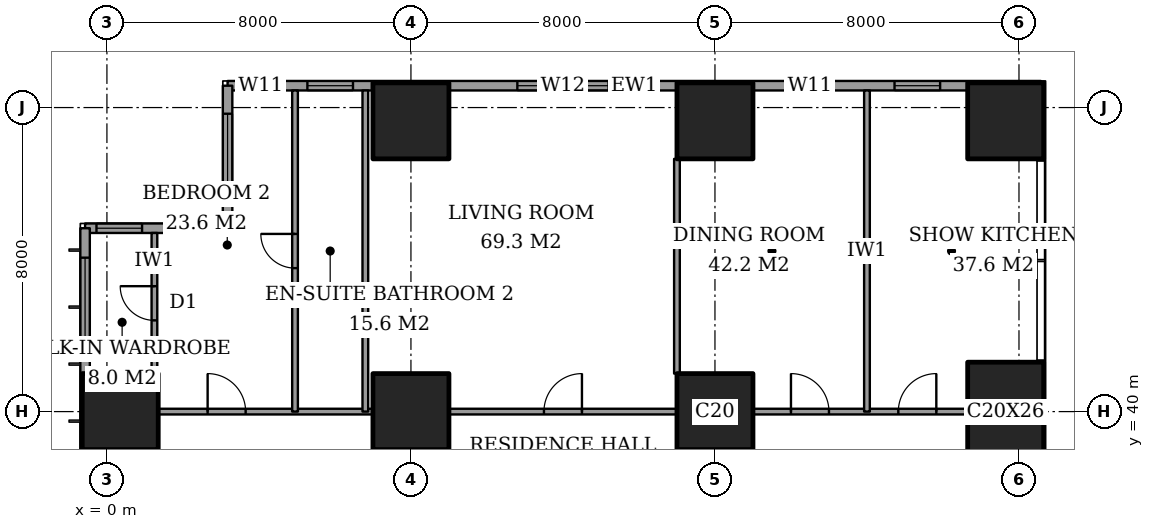
"""IFC4 building model, lengths in metres.
Left out: names, types, materials, properties, quantities, classifications, styles, units other than length and angle.
Written with IfcOpenShell. Run it as: python <this file> out.ifc"""

import sys

from ifc_helpers import new_model, si_unit, direction, frame, frame_2d, origin, origin_2d, place, context, subcontext, project, spatial, rectangle, extrude, element, fill, save


model = new_model("IFC4")
c1 = context("Model", 3, precision=1e-05, world=origin(), true_north=direction((0.0, 1.0)))
c2 = subcontext(c1, "Body", "Model", "MODEL_VIEW")
j1 = project(units=[si_unit("LENGTHUNIT", "METRE"), si_unit("PLANEANGLEUNIT", "RADIAN")], contexts=[c1])
p1 = place(None, origin())
s1 = spatial("IfcSite", under=j1, at=p1, CompositionType="ELEMENT")
p2 = place(p1, origin())
s2 = spatial("IfcBuilding", under=s1, at=p2, CompositionType="ELEMENT")
p3 = place(p2, frame((0.0, 0.0, 150.2)))
s3 = spatial("IfcBuildingStorey", under=s2, at=p3, CompositionType="ELEMENT", Elevation=150.2)
for number, where, z_axis, x_axis in (
    (1, (0.35, 40.0, 0.0), (0.0, 0.0, 1.0), (1.0, 0.0, 0.0)),
    (2, (8.0, 40.0, 0.0), (0.0, 0.0, 1.0), (1.0, 0.0, 0.0)),
    (3, (8.0, 47.65, 0.0), (0.0, 0.0, 1.0), (1.0, 0.0, 0.0)),
    (4, (16.0, 40.0, 0.0), (0.0, 0.0, 1.0), (1.0, 0.0, 0.0)),
    (5, (16.0, 47.65, 0.0), (0.0, 0.0, 1.0), (1.0, 0.0, 0.0)),
):
    element("IfcColumn", number, at=place(p3, frame(where, z_axis=z_axis, x_axis=x_axis)), inside=s3, PredefinedType="COLUMN", context=c2, shape_type="SweptSolid", body=[
        extrude(rectangle(XDim=2.0, YDim=2.0, at=origin_2d()), origin(), (0.0, 0.0, 1.0), 3.6),
    ])
p4 = place(p3, frame((23.65, 40.0, 0.0), z_axis=(0.0, 0.0, 1.0), x_axis=(1.0, 0.0, 0.0)))
e6 = element("IfcColumn", 6, at=p4, inside=s3, PredefinedType="COLUMN", context=c2, shape_type="SweptSolid", body=[
    extrude(rectangle(XDim=2.0, YDim=2.6, at=origin_2d()), origin(), (0.0, 0.0, 1.0), 3.6),
])
p5 = place(p3, frame((23.65, 47.65, 0.0), z_axis=(0.0, 0.0, 1.0), x_axis=(1.0, 0.0, 0.0)))
e7 = element("IfcColumn", 7, at=p5, inside=s3, PredefinedType="COLUMN", context=c2, shape_type="SweptSolid", body=[
    extrude(rectangle(XDim=2.0, YDim=2.0, at=origin_2d()), origin(), (0.0, 0.0, 1.0), 3.6),
])
p6 = place(p3, frame((24.575, 48.575, 0.0), z_axis=(0.0, 0.0, 1.0), x_axis=(-1.0, 0.0, 0.0)))
e8 = element("IfcWall", 8, at=p6, inside=s3, PredefinedType="SOLIDWALL", context=c2, shape_type="SweptSolid", body=[
    extrude(rectangle(XDim=21.4, YDim=0.25, at=frame_2d((10.7, 0.0))), origin(), (0.0, 0.0, 1.0), 3.6),
])
p7 = place(p6, frame((2.65, 0.0, 0.4)))
e9 = element("IfcOpeningElement", 9, at=p7, cuts=e8, PredefinedType="OPENING", context=c2, shape_type="SweptSolid", body=[
    extrude(rectangle(XDim=1.2, YDim=2.2, at=frame_2d((0.6, 1.1))), frame((0.0, 0.135, 0.0), z_axis=(0.0, -1.0, 0.0), x_axis=(1.0, 0.0, 0.0)), (0.0, 0.0, 1.0), 0.27),
])
p8 = place(p6, frame((5.475, 0.0, 0.4)))
e10 = element("IfcOpeningElement", 10, at=p8, cuts=e8, PredefinedType="OPENING", context=c2, shape_type="SweptSolid", body=[
    extrude(rectangle(XDim=1.2, YDim=2.2, at=frame_2d((0.6, 1.1))), frame((0.0, 0.135, 0.0), z_axis=(0.0, -1.0, 0.0), x_axis=(1.0, 0.0, 0.0)), (0.0, 0.0, 1.0), 0.27),
])
p9 = place(p6, frame((11.375, 0.0, 0.4)))
e11 = element("IfcOpeningElement", 11, at=p9, cuts=e8, PredefinedType="OPENING", context=c2, shape_type="SweptSolid", body=[
    extrude(rectangle(XDim=2.4, YDim=2.2, at=frame_2d((1.2, 1.1))), frame((0.0, 0.135, 0.0), z_axis=(0.0, -1.0, 0.0), x_axis=(1.0, 0.0, 0.0)), (0.0, 0.0, 1.0), 0.27),
])
p10 = place(p6, frame((18.1, 0.0, 0.4)))
e12 = element("IfcOpeningElement", 12, at=p10, cuts=e8, PredefinedType="OPENING", context=c2, shape_type="SweptSolid", body=[
    extrude(rectangle(XDim=1.2, YDim=2.2, at=frame_2d((0.6, 1.1))), frame((0.0, 0.135, 0.0), z_axis=(0.0, -1.0, 0.0), x_axis=(1.0, 0.0, 0.0)), (0.0, 0.0, 1.0), 0.27),
])
p11 = place(p6, frame((19.925, 0.0, 0.4)))
e13 = element("IfcOpeningElement", 13, at=p11, cuts=e8, PredefinedType="OPENING", context=c2, shape_type="SweptSolid", body=[
    extrude(rectangle(XDim=1.2, YDim=2.2, at=frame_2d((0.6, 1.1))), frame((0.0, 0.135, 0.0), z_axis=(0.0, -1.0, 0.0), x_axis=(1.0, 0.0, 0.0)), (0.0, 0.0, 1.0), 0.27),
])
p12 = place(p3, frame((3.175, 48.575, 0.0), z_axis=(0.0, 0.0, 1.0), x_axis=(0.0, -1.0, 0.0)))
e14 = element("IfcWall", 14, at=p12, inside=s3, PredefinedType="SOLIDWALL", context=c2, shape_type="SweptSolid", body=[
    extrude(rectangle(XDim=3.75, YDim=0.25, at=frame_2d((1.875, 0.0))), origin(), (0.0, 0.0, 1.0), 3.6),
])
p13 = place(p12, frame((0.738, 0.0, 0.4)))
e15 = element("IfcOpeningElement", 15, at=p13, cuts=e14, PredefinedType="OPENING", context=c2, shape_type="SweptSolid", body=[
    extrude(rectangle(XDim=2.4, YDim=2.2, at=frame_2d((1.2, 1.1))), frame((0.0, 0.135, 0.0), z_axis=(0.0, -1.0, 0.0), x_axis=(1.0, 0.0, 0.0)), (0.0, 0.0, 1.0), 0.27),
])
p14 = place(p3, frame((3.175, 44.825, 0.0), z_axis=(0.0, 0.0, 1.0), x_axis=(-1.0, 0.0, 0.0)))
e16 = element("IfcWall", 16, at=p14, inside=s3, PredefinedType="SOLIDWALL", context=c2, shape_type="SweptSolid", body=[
    extrude(rectangle(XDim=3.75, YDim=0.25, at=frame_2d((1.875, 0.0))), origin(), (0.0, 0.0, 1.0), 3.6),
])
p15 = place(p14, frame((0.363, 0.0, 0.4)))
e17 = element("IfcOpeningElement", 17, at=p15, cuts=e16, PredefinedType="OPENING", context=c2, shape_type="SweptSolid", body=[
    extrude(rectangle(XDim=1.2, YDim=2.2, at=frame_2d((0.6, 1.1))), frame((0.0, 0.135, 0.0), z_axis=(0.0, -1.0, 0.0), x_axis=(1.0, 0.0, 0.0)), (0.0, 0.0, 1.0), 0.27),
])
p16 = place(p14, frame((2.25, 0.0, 0.4)))
e18 = element("IfcOpeningElement", 18, at=p16, cuts=e16, PredefinedType="OPENING", context=c2, shape_type="SweptSolid", body=[
    extrude(rectangle(XDim=1.2, YDim=2.2, at=frame_2d((0.6, 1.1))), frame((0.0, 0.135, 0.0), z_axis=(0.0, -1.0, 0.0), x_axis=(1.0, 0.0, 0.0)), (0.0, 0.0, 1.0), 0.27),
])
p17 = place(p3, frame((-0.575, 44.825, 0.0), z_axis=(0.0, 0.0, 1.0), x_axis=(0.0, -1.0, 0.0)))
e19 = element("IfcWall", 19, at=p17, inside=s3, PredefinedType="SOLIDWALL", context=c2, shape_type="SweptSolid", body=[
    extrude(rectangle(XDim=41.65, YDim=0.25, at=frame_2d((20.825, 0.0))), origin(), (0.0, 0.0, 1.0), 3.6),
])
p18 = place(p17, frame((0.775, 0.0, 0.4)))
e20 = element("IfcOpeningElement", 20, at=p18, cuts=e19, PredefinedType="OPENING", context=c2, shape_type="SweptSolid", body=[
    extrude(rectangle(XDim=2.4, YDim=2.2, at=frame_2d((1.2, 1.1))), frame((0.0, 0.135, 0.0), z_axis=(0.0, -1.0, 0.0), x_axis=(1.0, 0.0, 0.0)), (0.0, 0.0, 1.0), 0.27),
])
p19 = place(p17, frame((6.1, 0.0, 0.4)))
e21 = element("IfcOpeningElement", 21, at=p19, cuts=e19, PredefinedType="OPENING", context=c2, shape_type="SweptSolid", body=[
    extrude(rectangle(XDim=1.2, YDim=2.2, at=frame_2d((0.6, 1.1))), frame((0.0, 0.135, 0.0), z_axis=(0.0, -1.0, 0.0), x_axis=(1.0, 0.0, 0.0)), (0.0, 0.0, 1.0), 0.27),
])
p20 = place(p17, frame((8.425, 0.0, 0.4)))
e22 = element("IfcOpeningElement", 22, at=p20, cuts=e19, PredefinedType="OPENING", context=c2, shape_type="SweptSolid", body=[
    extrude(rectangle(XDim=2.4, YDim=2.2, at=frame_2d((1.2, 1.1))), frame((0.0, 0.135, 0.0), z_axis=(0.0, -1.0, 0.0), x_axis=(1.0, 0.0, 0.0)), (0.0, 0.0, 1.0), 0.27),
])
p21 = place(p17, frame((15.625, 0.0, 0.4)))
e23 = element("IfcOpeningElement", 23, at=p21, cuts=e19, PredefinedType="OPENING", context=c2, shape_type="SweptSolid", body=[
    extrude(rectangle(XDim=2.4, YDim=2.2, at=frame_2d((1.2, 1.1))), frame((0.0, 0.135, 0.0), z_axis=(0.0, -1.0, 0.0), x_axis=(1.0, 0.0, 0.0)), (0.0, 0.0, 1.0), 0.27),
])
p22 = place(p17, frame((23.625, 0.0, 0.4)))
e24 = element("IfcOpeningElement", 24, at=p22, cuts=e19, PredefinedType="OPENING", context=c2, shape_type="SweptSolid", body=[
    extrude(rectangle(XDim=2.4, YDim=2.2, at=frame_2d((1.2, 1.1))), frame((0.0, 0.135, 0.0), z_axis=(0.0, -1.0, 0.0), x_axis=(1.0, 0.0, 0.0)), (0.0, 0.0, 1.0), 0.27),
])
p23 = place(p17, frame((30.625, 0.0, 0.4)))
e25 = element("IfcOpeningElement", 25, at=p23, cuts=e19, PredefinedType="OPENING", context=c2, shape_type="SweptSolid", body=[
    extrude(rectangle(XDim=2.4, YDim=2.2, at=frame_2d((1.2, 1.1))), frame((0.0, 0.135, 0.0), z_axis=(0.0, -1.0, 0.0), x_axis=(1.0, 0.0, 0.0)), (0.0, 0.0, 1.0), 0.27),
])
p24 = place(p17, frame((34.225, 0.0, 0.4)))
e26 = element("IfcOpeningElement", 26, at=p24, cuts=e19, PredefinedType="OPENING", context=c2, shape_type="SweptSolid", body=[
    extrude(rectangle(XDim=1.2, YDim=2.2, at=frame_2d((0.6, 1.1))), frame((0.0, 0.135, 0.0), z_axis=(0.0, -1.0, 0.0), x_axis=(1.0, 0.0, 0.0)), (0.0, 0.0, 1.0), 0.27),
])
p25 = place(p17, frame((38.475, 0.0, 0.4)))
e27 = element("IfcOpeningElement", 27, at=p25, cuts=e19, PredefinedType="OPENING", context=c2, shape_type="SweptSolid", body=[
    extrude(rectangle(XDim=2.4, YDim=2.2, at=frame_2d((1.2, 1.1))), frame((0.0, 0.135, 0.0), z_axis=(0.0, -1.0, 0.0), x_axis=(1.0, 0.0, 0.0)), (0.0, 0.0, 1.0), 0.27),
])
p26 = place(p3, frame((1.35, 40.0, 0.0), z_axis=(0.0, 0.0, 1.0), x_axis=(1.0, 0.0, 0.0)))
e28 = element("IfcWall", 28, at=p26, inside=s3, PredefinedType="PARTITIONING", context=c2, shape_type="SweptSolid", body=[
    extrude(rectangle(XDim=5.65, YDim=0.15, at=frame_2d((2.825, 0.0))), origin(), (0.0, 0.0, 1.0), 3.35),
])
p27 = place(p26, frame((1.3, 0.0, 0.0)))
e29 = element("IfcOpeningElement", 29, at=p27, cuts=e28, PredefinedType="OPENING", context=c2, shape_type="SweptSolid", body=[
    extrude(rectangle(XDim=1.0, YDim=2.1, at=frame_2d((0.5, 1.05))), frame((0.0, 0.085, 0.0), z_axis=(0.0, -1.0, 0.0), x_axis=(1.0, 0.0, 0.0)), (0.0, 0.0, 1.0), 0.17),
])
p28 = place(p3, frame((9.0, 40.0, 0.0), z_axis=(0.0, 0.0, 1.0), x_axis=(1.0, 0.0, 0.0)))
e30 = element("IfcWall", 30, at=p28, inside=s3, PredefinedType="PARTITIONING", context=c2, shape_type="SweptSolid", body=[
    extrude(rectangle(XDim=6.0, YDim=0.15, at=frame_2d((3.0, 0.0))), origin(), (0.0, 0.0, 1.0), 3.35),
])
p29 = place(p28, frame((2.5, 0.0, 0.0)))
e31 = element("IfcOpeningElement", 31, at=p29, cuts=e30, PredefinedType="OPENING", context=c2, shape_type="SweptSolid", body=[
    extrude(rectangle(XDim=1.0, YDim=2.1, at=frame_2d((0.5, 1.05))), frame((0.0, 0.085, 0.0), z_axis=(0.0, -1.0, 0.0), x_axis=(1.0, 0.0, 0.0)), (0.0, 0.0, 1.0), 0.17),
])
p30 = place(p3, frame((17.0, 40.0, 0.0), z_axis=(0.0, 0.0, 1.0), x_axis=(1.0, 0.0, 0.0)))
e32 = element("IfcWall", 32, at=p30, inside=s3, PredefinedType="PARTITIONING", context=c2, shape_type="SweptSolid", body=[
    extrude(rectangle(XDim=5.65, YDim=0.15, at=frame_2d((2.825, 0.0))), origin(), (0.0, 0.0, 1.0), 3.35),
])
p31 = place(p30, frame((1.0, 0.0, 0.0)))
e33 = element("IfcOpeningElement", 33, at=p31, cuts=e32, PredefinedType="OPENING", context=c2, shape_type="SweptSolid", body=[
    extrude(rectangle(XDim=1.0, YDim=2.1, at=frame_2d((0.5, 1.05))), frame((0.0, 0.085, 0.0), z_axis=(0.0, -1.0, 0.0), x_axis=(1.0, 0.0, 0.0)), (0.0, 0.0, 1.0), 0.17),
])
p32 = place(p30, frame((3.825, 0.0, 0.0)))
e34 = element("IfcOpeningElement", 34, at=p32, cuts=e32, PredefinedType="OPENING", context=c2, shape_type="SweptSolid", body=[
    extrude(rectangle(XDim=1.0, YDim=2.1, at=frame_2d((0.5, 1.05))), frame((0.0, 0.085, 0.0), z_axis=(0.0, -1.0, 0.0), x_axis=(1.0, 0.0, 0.0)), (0.0, 0.0, 1.0), 0.17),
])
p33 = place(p3, frame((1.25, 41.0, 0.0), z_axis=(0.0, 0.0, 1.0), x_axis=(0.0, 1.0, 0.0)))
e35 = element("IfcWall", 35, at=p33, inside=s3, PredefinedType="PARTITIONING", context=c2, shape_type="SweptSolid", body=[
    extrude(rectangle(XDim=3.7, YDim=0.15, at=frame_2d((1.85, 0.0))), origin(), (0.0, 0.0, 1.0), 3.35),
])
p34 = place(p33, frame((1.4, 0.0, 0.0)))
e36 = element("IfcOpeningElement", 36, at=p34, cuts=e35, PredefinedType="OPENING", context=c2, shape_type="SweptSolid", body=[
    extrude(rectangle(XDim=0.9, YDim=2.1, at=frame_2d((0.45, 1.05))), frame((0.0, 0.085, 0.0), z_axis=(0.0, -1.0, 0.0), x_axis=(1.0, 0.0, 0.0)), (0.0, 0.0, 1.0), 0.17),
])
p35 = place(p3, frame((4.95, 40.0, 0.0), z_axis=(0.0, 0.0, 1.0), x_axis=(0.0, 1.0, 0.0)))
e37 = element("IfcWall", 37, at=p35, inside=s3, PredefinedType="PARTITIONING", context=c2, shape_type="SweptSolid", body=[
    extrude(rectangle(XDim=8.45, YDim=0.15, at=frame_2d((4.225, 0.0))), origin(), (0.0, 0.0, 1.0), 3.35),
])
p36 = place(p35, frame((3.775, 0.0, 0.0)))
e38 = element("IfcOpeningElement", 38, at=p36, cuts=e37, PredefinedType="OPENING", context=c2, shape_type="SweptSolid", body=[
    extrude(rectangle(XDim=0.9, YDim=2.1, at=frame_2d((0.45, 1.05))), frame((0.0, 0.085, 0.0), z_axis=(0.0, -1.0, 0.0), x_axis=(1.0, 0.0, 0.0)), (0.0, 0.0, 1.0), 0.17),
])
p37 = place(p3, frame((6.8, 40.0, 0.0), z_axis=(0.0, 0.0, 1.0), x_axis=(0.0, 1.0, 0.0)))
e39 = element("IfcWall", 39, at=p37, inside=s3, PredefinedType="PARTITIONING", context=c2, shape_type="SweptSolid", body=[
    extrude(rectangle(XDim=8.45, YDim=0.15, at=frame_2d((4.225, 0.0))), origin(), (0.0, 0.0, 1.0), 3.35),
])
p38 = place(p3, frame((15.0, 41.0, 0.0), z_axis=(0.0, 0.0, 1.0), x_axis=(0.0, 1.0, 0.0)))
e40 = element("IfcWall", 40, at=p38, inside=s3, PredefinedType="PARTITIONING", context=c2, shape_type="SweptSolid", body=[
    extrude(rectangle(XDim=5.65, YDim=0.15, at=frame_2d((2.825, 0.0))), origin(), (0.0, 0.0, 1.0), 3.35),
])
p39 = place(p3, frame((20.0, 40.0, 0.0), z_axis=(0.0, 0.0, 1.0), x_axis=(0.0, 1.0, 0.0)))
e41 = element("IfcWall", 41, at=p39, inside=s3, PredefinedType="PARTITIONING", context=c2, shape_type="SweptSolid", body=[
    extrude(rectangle(XDim=8.45, YDim=0.15, at=frame_2d((4.225, 0.0))), origin(), (0.0, 0.0, 1.0), 3.35),
])
p40 = place(p7, origin())
e42 = element("IfcWindow", 42, at=p40, inside=s3, PartitioningType="SINGLE_PANEL", PredefinedType="WINDOW", context=c2, shape_type="SweptSolid", body=[
    extrude(rectangle(XDim=1.2, YDim=2.2, at=frame_2d((0.6, 1.1))), frame((0.0, 0.03, 0.0), z_axis=(0.0, -1.0, 0.0), x_axis=(1.0, 0.0, 0.0)), (0.0, 0.0, 1.0), 0.06),
])
fill(e9, e42)
p41 = place(p8, origin())
e43 = element("IfcWindow", 43, at=p41, inside=s3, PartitioningType="SINGLE_PANEL", PredefinedType="WINDOW", context=c2, shape_type="SweptSolid", body=[
    extrude(rectangle(XDim=1.2, YDim=2.2, at=frame_2d((0.6, 1.1))), frame((0.0, 0.03, 0.0), z_axis=(0.0, -1.0, 0.0), x_axis=(1.0, 0.0, 0.0)), (0.0, 0.0, 1.0), 0.06),
])
fill(e10, e43)
p42 = place(p9, origin())
e44 = element("IfcWindow", 44, at=p42, inside=s3, PartitioningType="SINGLE_PANEL", PredefinedType="WINDOW", context=c2, shape_type="SweptSolid", body=[
    extrude(rectangle(XDim=2.4, YDim=2.2, at=frame_2d((1.2, 1.1))), frame((0.0, 0.03, 0.0), z_axis=(0.0, -1.0, 0.0), x_axis=(1.0, 0.0, 0.0)), (0.0, 0.0, 1.0), 0.06),
])
fill(e11, e44)
p43 = place(p10, origin())
e45 = element("IfcWindow", 45, at=p43, inside=s3, PartitioningType="SINGLE_PANEL", PredefinedType="WINDOW", context=c2, shape_type="SweptSolid", body=[
    extrude(rectangle(XDim=1.2, YDim=2.2, at=frame_2d((0.6, 1.1))), frame((0.0, 0.03, 0.0), z_axis=(0.0, -1.0, 0.0), x_axis=(1.0, 0.0, 0.0)), (0.0, 0.0, 1.0), 0.06),
])
fill(e12, e45)
p44 = place(p11, origin())
e46 = element("IfcWindow", 46, at=p44, inside=s3, PartitioningType="SINGLE_PANEL", PredefinedType="WINDOW", context=c2, shape_type="SweptSolid", body=[
    extrude(rectangle(XDim=1.2, YDim=2.2, at=frame_2d((0.6, 1.1))), frame((0.0, 0.03, 0.0), z_axis=(0.0, -1.0, 0.0), x_axis=(1.0, 0.0, 0.0)), (0.0, 0.0, 1.0), 0.06),
])
fill(e13, e46)
p45 = place(p13, origin())
e47 = element("IfcWindow", 47, at=p45, inside=s3, PartitioningType="SINGLE_PANEL", PredefinedType="WINDOW", context=c2, shape_type="SweptSolid", body=[
    extrude(rectangle(XDim=2.4, YDim=2.2, at=frame_2d((1.2, 1.1))), frame((0.0, 0.03, 0.0), z_axis=(0.0, -1.0, 0.0), x_axis=(1.0, 0.0, 0.0)), (0.0, 0.0, 1.0), 0.06),
])
fill(e15, e47)
p46 = place(p15, origin())
e48 = element("IfcWindow", 48, at=p46, inside=s3, PartitioningType="SINGLE_PANEL", PredefinedType="WINDOW", context=c2, shape_type="SweptSolid", body=[
    extrude(rectangle(XDim=1.2, YDim=2.2, at=frame_2d((0.6, 1.1))), frame((0.0, 0.03, 0.0), z_axis=(0.0, -1.0, 0.0), x_axis=(1.0, 0.0, 0.0)), (0.0, 0.0, 1.0), 0.06),
])
fill(e17, e48)
p47 = place(p16, origin())
e49 = element("IfcWindow", 49, at=p47, inside=s3, PartitioningType="SINGLE_PANEL", PredefinedType="WINDOW", context=c2, shape_type="SweptSolid", body=[
    extrude(rectangle(XDim=1.2, YDim=2.2, at=frame_2d((0.6, 1.1))), frame((0.0, 0.03, 0.0), z_axis=(0.0, -1.0, 0.0), x_axis=(1.0, 0.0, 0.0)), (0.0, 0.0, 1.0), 0.06),
])
fill(e18, e49)
p48 = place(p18, origin())
e50 = element("IfcWindow", 50, at=p48, inside=s3, PartitioningType="SINGLE_PANEL", PredefinedType="WINDOW", context=c2, shape_type="SweptSolid", body=[
    extrude(rectangle(XDim=2.4, YDim=2.2, at=frame_2d((1.2, 1.1))), frame((0.0, 0.03, 0.0), z_axis=(0.0, -1.0, 0.0), x_axis=(1.0, 0.0, 0.0)), (0.0, 0.0, 1.0), 0.06),
])
fill(e20, e50)
p49 = place(p34, origin())
e51 = element("IfcDoor", 51, at=p49, inside=s3, OperationType="SINGLE_SWING_LEFT", PredefinedType="DOOR", context=c2, shape_type="SweptSolid", body=[
    extrude(rectangle(XDim=0.9, YDim=2.1, at=frame_2d((0.45, 1.05))), frame((0.0, 0.025, 0.0), z_axis=(0.0, -1.0, 0.0), x_axis=(1.0, 0.0, 0.0)), (0.0, 0.0, 1.0), 0.05),
])
fill(e36, e51)
p50 = place(p27, origin())
e52 = element("IfcDoor", 52, at=p50, inside=s3, OperationType="SINGLE_SWING_RIGHT", PredefinedType="DOOR", context=c2, shape_type="SweptSolid", body=[
    extrude(rectangle(XDim=1.0, YDim=2.1, at=frame_2d((0.5, 1.05))), frame((0.0, 0.025, 0.0), z_axis=(0.0, -1.0, 0.0), x_axis=(1.0, 0.0, 0.0)), (0.0, 0.0, 1.0), 0.05),
])
fill(e29, e52)
p51 = place(p36, origin())
e53 = element("IfcDoor", 53, at=p51, inside=s3, OperationType="SINGLE_SWING_LEFT", PredefinedType="DOOR", context=c2, shape_type="SweptSolid", body=[
    extrude(rectangle(XDim=0.9, YDim=2.1, at=frame_2d((0.45, 1.05))), frame((0.0, 0.025, 0.0), z_axis=(0.0, -1.0, 0.0), x_axis=(1.0, 0.0, 0.0)), (0.0, 0.0, 1.0), 0.05),
])
fill(e38, e53)
p52 = place(p29, origin())
e54 = element("IfcDoor", 54, at=p52, inside=s3, OperationType="SINGLE_SWING_LEFT", PredefinedType="DOOR", context=c2, shape_type="SweptSolid", body=[
    extrude(rectangle(XDim=1.0, YDim=2.1, at=frame_2d((0.5, 1.05))), frame((0.0, 0.025, 0.0), z_axis=(0.0, -1.0, 0.0), x_axis=(1.0, 0.0, 0.0)), (0.0, 0.0, 1.0), 0.05),
])
fill(e31, e54)
p53 = place(p31, origin())
e55 = element("IfcDoor", 55, at=p53, inside=s3, OperationType="SINGLE_SWING_RIGHT", PredefinedType="DOOR", context=c2, shape_type="SweptSolid", body=[
    extrude(rectangle(XDim=1.0, YDim=2.1, at=frame_2d((0.5, 1.05))), frame((0.0, 0.025, 0.0), z_axis=(0.0, -1.0, 0.0), x_axis=(1.0, 0.0, 0.0)), (0.0, 0.0, 1.0), 0.05),
])
fill(e33, e55)
p54 = place(p32, origin())
e56 = element("IfcDoor", 56, at=p54, inside=s3, OperationType="SINGLE_SWING_LEFT", PredefinedType="DOOR", context=c2, shape_type="SweptSolid", body=[
    extrude(rectangle(XDim=1.0, YDim=2.1, at=frame_2d((0.5, 1.05))), frame((0.0, 0.025, 0.0), z_axis=(0.0, -1.0, 0.0), x_axis=(1.0, 0.0, 0.0)), (0.0, 0.0, 1.0), 0.05),
])
fill(e34, e56)
save(model, sys.argv[1])
